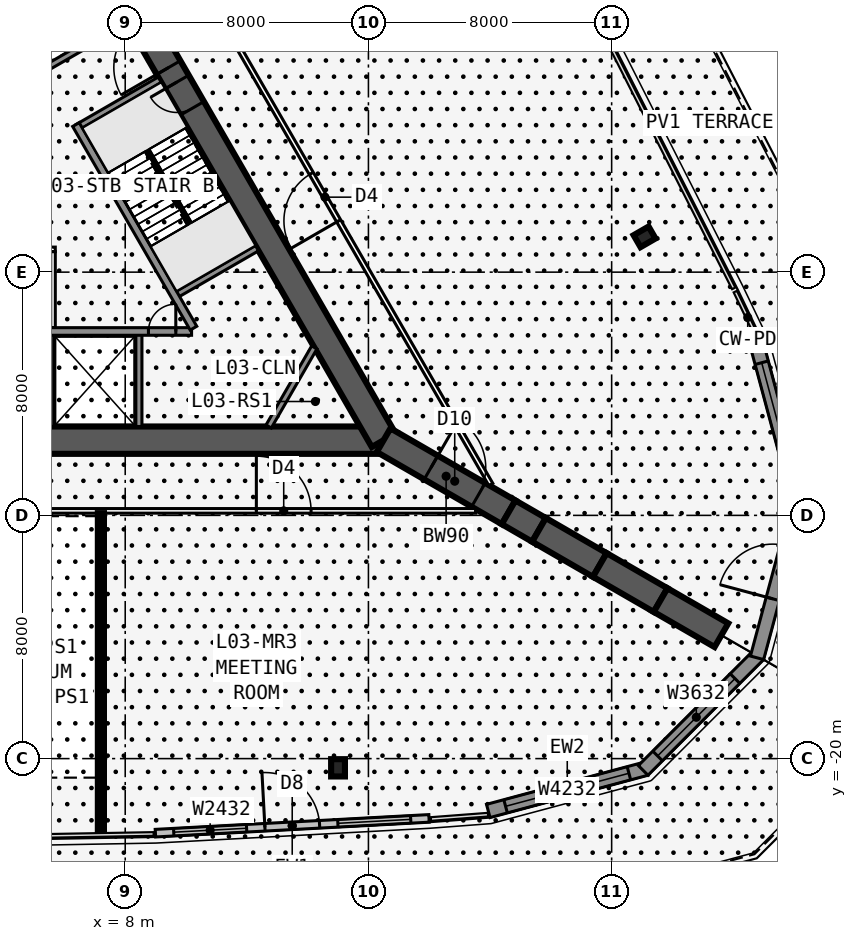
"""IFC4 building model, lengths in metres.
Left out: names, types, materials, properties, quantities, classifications, styles, units other than length and angle.
Written with IfcOpenShell. Run it as: python <this file> out.ifc"""

import sys

from ifc_helpers import new_model, si_unit, direction, frame, frame_2d, origin, origin_2d, place, context, subcontext, project, spatial, rectangle, i_section, extrude, element, fill, save


model = new_model("IFC4")
c1 = context("Model", 3, precision=1e-05, world=origin(), true_north=direction((0.0, 1.0)))
c2 = subcontext(c1, "Body", "Model", "MODEL_VIEW")
j1 = project(units=[si_unit("LENGTHUNIT", "METRE"), si_unit("PLANEANGLEUNIT", "RADIAN")], contexts=[c1])
p1 = place(None, origin())
s1 = spatial("IfcSite", under=j1, at=p1, CompositionType="ELEMENT")
p2 = place(p1, origin())
s2 = spatial("IfcBuilding", under=s1, at=p2, CompositionType="ELEMENT")
p3 = place(p2, frame((0.0, 0.0, 17.5)))
s3 = spatial("IfcBuildingStorey", under=s2, at=p3, CompositionType="ELEMENT", Elevation=17.5)
p4 = place(p3, frame((-16.5, -9.526, 0.0), z_axis=(0.0, 0.0, 1.0), x_axis=(1.0, 0.0, 0.0)))
e1 = element("IfcWall", 1, at=p4, inside=s3, PredefinedType="SHEAR", context=c2, shape_type="SweptSolid", body=[
    extrude(rectangle(XDim=33.0, YDim=0.9, at=frame_2d((16.5, 0.0))), origin(), (0.0, 0.0, 1.0), 5.0),
])
p5 = place(p4, frame((14.05, 0.0, 0.0)))
e2 = element("IfcOpeningElement", 2, at=p5, cuts=e1, PredefinedType="OPENING", context=c2, shape_type="SweptSolid", body=[
    extrude(rectangle(XDim=1.8, YDim=2.13, at=frame_2d((0.9, 1.065))), frame((0.0, 0.46, 0.0), z_axis=(0.0, -1.0, 0.0), x_axis=(1.0, 0.0, 0.0)), (0.0, 0.0, 1.0), 0.92),
])
p6 = place(p3, frame((-0.55, -5.951, 0.0), z_axis=(0.0, 0.0, 1.0), x_axis=(1.0, 0.0, 0.0)))
e3 = element("IfcWall", 3, at=p6, inside=s3, PredefinedType="SOLIDWALL", context=c2, shape_type="SweptSolid", body=[
    extrude(rectangle(XDim=10.733, YDim=0.25, at=frame_2d((5.366, 0.0))), origin(), (0.0, 0.0, 1.0), 4.75),
])
p7 = place(p6, frame((9.314, 0.0, 0.0)))
e4 = element("IfcOpeningElement", 4, at=p7, cuts=e3, PredefinedType="OPENING", context=c2, shape_type="SweptSolid", body=[
    extrude(rectangle(XDim=0.9, YDim=2.13, at=frame_2d((0.45, 1.065))), frame((0.0, 0.135, 0.0), z_axis=(0.0, -1.0, 0.0), x_axis=(1.0, 0.0, 0.0)), (0.0, 0.0, 1.0), 0.27),
])
p8 = place(p6, frame((1.05, 0.0, 0.0)))
e5 = element("IfcOpeningElement", 5, at=p8, cuts=e3, PredefinedType="OPENING", context=c2, shape_type="SweptSolid", body=[
    extrude(rectangle(XDim=1.1, YDim=2.13, at=frame_2d((0.55, 1.065))), frame((0.0, 0.135, 0.0), z_axis=(0.0, -1.0, 0.0), x_axis=(1.0, 0.0, 0.0)), (0.0, 0.0, 1.0), 0.27),
])
p9 = place(p6, frame((4.05, 0.0, 0.0)))
e6 = element("IfcOpeningElement", 6, at=p9, cuts=e3, PredefinedType="OPENING", context=c2, shape_type="SweptSolid", body=[
    extrude(rectangle(XDim=1.1, YDim=2.13, at=frame_2d((0.55, 1.065))), frame((0.0, 0.135, 0.0), z_axis=(0.0, -1.0, 0.0), x_axis=(1.0, 0.0, 0.0)), (0.0, 0.0, 1.0), 0.27),
])
for number, where, z_axis, x_axis in (
    (7, (5.55, -5.951, 0.0), (0.0, 0.0, 1.0), (0.0, -1.0, 0.0)),
    (8, (8.45, -5.951, 0.0), (0.0, 0.0, 1.0), (0.0, -1.0, 0.0)),
):
    element("IfcWall", number, at=place(p3, frame(where, z_axis=z_axis, x_axis=x_axis)), inside=s3, PredefinedType="SOLIDWALL", context=c2, shape_type="SweptSolid", body=[
        extrude(rectangle(XDim=3.125, YDim=0.2, at=frame_2d((1.562, 0.0))), origin(), (0.0, 0.0, 1.0), 4.75),
    ])
p10 = place(p3, frame((16.5, -9.526, 0.0), z_axis=(0.0, 0.0, 1.0), x_axis=(-0.499999749417, 0.866025548458, 0.0)))
e9 = element("IfcWall", 9, at=p10, inside=s3, PredefinedType="SHEAR", context=c2, shape_type="SweptSolid", body=[
    extrude(rectangle(XDim=33.0, YDim=0.9, at=frame_2d((16.5, 0.0))), origin(), (0.0, 0.0, 1.0), 5.0),
])
p11 = place(p10, frame((14.15, 0.0, 0.0)))
e10 = element("IfcOpeningElement", 10, at=p11, cuts=e9, PredefinedType="OPENING", context=c2, shape_type="SweptSolid", body=[
    extrude(rectangle(XDim=1.8, YDim=2.13, at=frame_2d((0.9, 1.065))), frame((0.0, 0.46, 0.0), z_axis=(0.0, -1.0, 0.0), x_axis=(1.0, 0.0, 0.0)), (0.0, 0.0, 1.0), 0.92),
])
p12 = place(p10, frame((12.6, 0.0, 0.0)))
e11 = element("IfcOpeningElement", 11, at=p12, cuts=e9, PredefinedType="OPENING", context=c2, shape_type="SweptSolid", body=[
    extrude(rectangle(XDim=1.0, YDim=2.13, at=frame_2d((0.5, 1.065))), frame((0.0, 0.46, 0.0), z_axis=(0.0, -1.0, 0.0), x_axis=(1.0, 0.0, 0.0)), (0.0, 0.0, 1.0), 0.92),
])
p13 = place(p3, frame((10.245, -5.843, 0.0), z_axis=(0.0, 0.0, 1.0), x_axis=(-0.499993009313, 0.866029439822, 0.0)))
e12 = element("IfcWall", 12, at=p13, inside=s3, PredefinedType="SOLIDWALL", context=c2, shape_type="SweptSolid", body=[
    extrude(rectangle(XDim=7.733, YDim=0.25, at=frame_2d((3.866, 0.0))), origin(), (0.0, 0.0, 1.0), 4.75),
])
for number, where, z_axis, x_axis in (
    (13, (9.629, -4.775, 0.0), (0.0, 0.0, 1.0), (0.866, 0.5, 0.0)),
    (14, (6.429, 0.767, 0.0), (0.0, 0.0, 1.0), (0.866, 0.5, 0.0)),
    (15, (5.329, 2.673, 0.0), (0.0, 0.0, 1.0), (0.866, 0.5, 0.0)),
):
    element("IfcWall", number, at=place(p3, frame(where, z_axis=z_axis, x_axis=x_axis)), inside=s3, PredefinedType="SOLIDWALL", context=c2, shape_type="SweptSolid", body=[
        extrude(rectangle(XDim=3.125, YDim=0.2, at=frame_2d((1.562, 0.0))), origin(), (0.0, 0.0, 1.0), 4.75),
    ])
p14 = place(p3, frame((16.5, -9.526, 0.0), z_axis=(0.0, 0.0, 1.0), x_axis=(0.866031398331, -0.499989616998, 0.0)))
e16 = element("IfcWall", 16, at=p14, inside=s3, PredefinedType="SHEAR", context=c2, shape_type="SweptSolid", body=[
    extrude(rectangle(XDim=4.746, YDim=0.9, at=frame_2d((2.373, 0.0))), origin(), (0.0, 0.0, 1.0), 5.0),
])
p15 = place(p14, frame((1.8, 0.0, 0.0)))
e17 = element("IfcOpeningElement", 17, at=p15, cuts=e16, PredefinedType="OPENING", context=c2, shape_type="SweptSolid", body=[
    extrude(rectangle(XDim=1.8, YDim=2.13, at=frame_2d((0.9, 1.065))), frame((0.0, 0.46, 0.0), z_axis=(0.0, -1.0, 0.0), x_axis=(1.0, 0.0, 0.0)), (0.0, 0.0, 1.0), 0.92),
])
p16 = place(p3, frame((20.61, -11.899, 0.0), z_axis=(0.0, 0.0, 1.0), x_axis=(0.866009537788, -0.500027479704, 0.0)))
e18 = element("IfcWall", 18, at=p16, inside=s3, PredefinedType="SHEAR", context=c2, shape_type="SweptSolid", body=[
    extrude(rectangle(XDim=1.155, YDim=0.9, at=frame_2d((0.577, 0.0))), origin(), (0.0, 0.0, 1.0), 5.0),
])
for number, where, z_axis, x_axis in (
    (19, (21.61, -12.477, 0.0), (0.0, 0.0, 1.0), (0.866, -0.5, 0.0)),
    (20, (23.61, -13.631, 0.0), (0.0, 0.0, 1.0), (0.866, -0.5, 0.0)),
    (21, (25.61, -14.786, 0.0), (0.0, 0.0, 1.0), (0.866, -0.5, 0.0)),
):
    element("IfcWall", number, at=place(p3, frame(where, z_axis=z_axis, x_axis=x_axis)), inside=s3, PredefinedType="SHEAR", context=c2, shape_type="SweptSolid", body=[
        extrude(rectangle(XDim=2.309, YDim=0.9, at=frame_2d((1.155, 0.0))), origin(), (0.0, 0.0, 1.0), 5.0),
    ])
for number, where, z_axis, x_axis in (
    (22, (15.0, -20.303, 0.0), (0.0, 0.0, 1.0), (1.0, 0.0, 0.0)),
    (23, (25.083, -2.839, 0.0), (0.0, 0.0, 1.0), (-0.5, 0.866, 0.0)),
):
    element("IfcColumn", number, at=place(p3, frame(where, z_axis=z_axis, x_axis=x_axis)), inside=s3, PredefinedType="COLUMN", context=c2, shape_type="SweptSolid", body=[
        extrude(i_section(OverallWidth=0.455, OverallDepth=0.569, WebThickness=0.078, FlangeThickness=0.125, at=origin_2d()), origin(), (0.0, 0.0, 1.0), 5.0),
    ])
p17 = place(p3, frame((8.993, -22.452, 0.0), z_axis=(0.0, 0.0, 1.0), x_axis=(0.998546137511, 0.053903722158, 0.0)))
e24 = element("IfcWall", 24, at=p17, inside=s3, PredefinedType="STANDARD", context=c2, shape_type="SweptSolid", body=[
    extrude(rectangle(XDim=9.013, YDim=0.25, at=frame_2d((4.507, 0.0))), origin(), (0.0, 0.0, 1.0), 4.75),
])
p18 = place(p17, frame((3.607, 0.0, 0.0)))
e25 = element("IfcOpeningElement", 25, at=p18, cuts=e24, PredefinedType="OPENING", context=c2, shape_type="SweptSolid", body=[
    extrude(rectangle(XDim=1.8, YDim=2.4, at=frame_2d((0.9, 1.2))), frame((0.0, 0.135, 0.0), z_axis=(0.0, -1.0, 0.0), x_axis=(1.0, 0.0, 0.0)), (0.0, 0.0, 1.0), 0.27),
])
p19 = place(p17, frame((0.603, 0.0, 0.6)))
e26 = element("IfcOpeningElement", 26, at=p19, cuts=e24, PredefinedType="OPENING", context=c2, shape_type="SweptSolid", body=[
    extrude(rectangle(XDim=2.4, YDim=3.2, at=frame_2d((1.2, 1.6))), frame((0.0, 0.135, 0.0), z_axis=(0.0, -1.0, 0.0), x_axis=(1.0, 0.0, 0.0)), (0.0, 0.0, 1.0), 0.27),
])
p20 = place(p17, frame((6.01, 0.0, 0.6)))
e27 = element("IfcOpeningElement", 27, at=p20, cuts=e24, PredefinedType="OPENING", context=c2, shape_type="SweptSolid", body=[
    extrude(rectangle(XDim=2.4, YDim=3.2, at=frame_2d((1.2, 1.6))), frame((0.0, 0.135, 0.0), z_axis=(0.0, -1.0, 0.0), x_axis=(1.0, 0.0, 0.0)), (0.0, 0.0, 1.0), 0.27),
])
p21 = place(p3, frame((19.942, -21.722, 0.0), z_axis=(0.0, 0.0, 1.0), x_axis=(0.965923133363, 0.258829095032, 0.0)))
e28 = element("IfcWall", 28, at=p21, inside=s3, PredefinedType="SOLIDWALL", context=c2, shape_type="SweptSolid", body=[
    extrude(rectangle(XDim=5.379, YDim=0.45, at=frame_2d((2.69, 0.0))), origin(), (0.0, 0.0, 1.0), 4.75),
])
p22 = place(p21, frame((0.59, 0.0, 0.6)))
e29 = element("IfcOpeningElement", 29, at=p22, cuts=e28, PredefinedType="OPENING", context=c2, shape_type="SweptSolid", body=[
    extrude(rectangle(XDim=4.2, YDim=3.2, at=frame_2d((2.1, 1.6))), frame((0.0, 0.235, 0.0), z_axis=(0.0, -1.0, 0.0), x_axis=(1.0, 0.0, 0.0)), (0.0, 0.0, 1.0), 0.47),
])
p23 = place(p3, frame((25.037, -20.388, 0.0), z_axis=(0.0, 0.0, 1.0), x_axis=(0.707084088779, 0.707129472866, 0.0)))
e30 = element("IfcWall", 30, at=p23, inside=s3, PredefinedType="SOLIDWALL", context=c2, shape_type="SweptSolid", body=[
    extrude(rectangle(XDim=5.379, YDim=0.45, at=frame_2d((2.69, 0.0))), origin(), (0.0, 0.0, 1.0), 4.75),
])
p24 = place(p23, frame((0.671, 0.0, 0.6)))
e31 = element("IfcOpeningElement", 31, at=p24, cuts=e30, PredefinedType="OPENING", context=c2, shape_type="SweptSolid", body=[
    extrude(rectangle(XDim=3.6, YDim=3.2, at=frame_2d((1.8, 1.6))), frame((0.0, 0.235, 0.0), z_axis=(0.0, -1.0, 0.0), x_axis=(1.0, 0.0, 0.0)), (0.0, 0.0, 1.0), 0.47),
])
p25 = place(p3, frame((28.783, -16.685, 0.0), z_axis=(0.0, 0.0, 1.0), x_axis=(0.258817748921, 0.965926173599, 0.0)))
e32 = element("IfcWall", 32, at=p25, inside=s3, PredefinedType="SOLIDWALL", context=c2, shape_type="SweptSolid", body=[
    extrude(rectangle(XDim=5.38, YDim=0.45, at=frame_2d((2.69, 0.0))), origin(), (0.0, 0.0, 1.0), 4.75),
])
p26 = place(p25, frame((2.008, 0.0, 0.0)))
e33 = element("IfcOpeningElement", 33, at=p26, cuts=e32, PredefinedType="OPENING", context=c2, shape_type="SweptSolid", body=[
    extrude(rectangle(XDim=1.8, YDim=2.4, at=frame_2d((0.9, 1.2))), frame((0.0, 0.235, 0.0), z_axis=(0.0, -1.0, 0.0), x_axis=(1.0, 0.0, 0.0)), (0.0, 0.0, 1.0), 0.47),
])
p27 = place(p3, frame((30.175, -11.605, 0.0), z_axis=(0.0, 0.0, 1.0), x_axis=(-0.258829095032, 0.965923133363, 0.0)))
e34 = element("IfcWall", 34, at=p27, inside=s3, PredefinedType="SOLIDWALL", context=c2, shape_type="SweptSolid", body=[
    extrude(rectangle(XDim=5.379, YDim=0.45, at=frame_2d((2.69, 0.0))), origin(), (0.0, 0.0, 1.0), 4.75),
])
p28 = place(p27, frame((0.59, 0.0, 0.6)))
e35 = element("IfcOpeningElement", 35, at=p28, cuts=e34, PredefinedType="OPENING", context=c2, shape_type="SweptSolid", body=[
    extrude(rectangle(XDim=4.2, YDim=3.2, at=frame_2d((2.1, 1.6))), frame((0.0, 0.235, 0.0), z_axis=(0.0, -1.0, 0.0), x_axis=(1.0, 0.0, 0.0)), (0.0, 0.0, 1.0), 0.47),
])
p29 = place(p3, frame((-19.527, -11.851, 0.0), z_axis=(0.0, 0.0, 1.0), x_axis=(1.0, 0.0, 0.0)))
e36 = element("IfcWall", 36, at=p29, inside=s3, PredefinedType="PARTITIONING", context=c2, shape_type="SweptSolid", body=[
    extrude(rectangle(XDim=39.054, YDim=0.15, at=frame_2d((19.527, 0.0))), origin(), (0.0, 0.0, 1.0), 4.75),
])
p30 = place(p29, frame((6.013, 0.0, 0.0)))
e37 = element("IfcOpeningElement", 37, at=p30, cuts=e36, PredefinedType="OPENING", context=c2, shape_type="SweptSolid", body=[
    extrude(rectangle(XDim=1.8, YDim=2.13, at=frame_2d((0.9, 1.065))), frame((0.0, 0.085, 0.0), z_axis=(0.0, -1.0, 0.0), x_axis=(1.0, 0.0, 0.0)), (0.0, 0.0, 1.0), 0.17),
])
p31 = place(p29, frame((16.627, 0.0, 0.0)))
e38 = element("IfcOpeningElement", 38, at=p31, cuts=e36, PredefinedType="OPENING", context=c2, shape_type="SweptSolid", body=[
    extrude(rectangle(XDim=1.8, YDim=2.13, at=frame_2d((0.9, 1.065))), frame((0.0, 0.085, 0.0), z_axis=(0.0, -1.0, 0.0), x_axis=(1.0, 0.0, 0.0)), (0.0, 0.0, 1.0), 0.17),
])
p32 = place(p29, frame((23.227, 0.0, 0.0)))
e39 = element("IfcOpeningElement", 39, at=p32, cuts=e36, PredefinedType="OPENING", context=c2, shape_type="SweptSolid", body=[
    extrude(rectangle(XDim=1.8, YDim=2.13, at=frame_2d((0.9, 1.065))), frame((0.0, 0.085, 0.0), z_axis=(0.0, -1.0, 0.0), x_axis=(1.0, 0.0, 0.0)), (0.0, 0.0, 1.0), 0.17),
])
p33 = place(p29, frame((31.841, 0.0, 0.0)))
e40 = element("IfcOpeningElement", 40, at=p33, cuts=e36, PredefinedType="OPENING", context=c2, shape_type="SweptSolid", body=[
    extrude(rectangle(XDim=1.8, YDim=2.13, at=frame_2d((0.9, 1.065))), frame((0.0, 0.085, 0.0), z_axis=(0.0, -1.0, 0.0), x_axis=(1.0, 0.0, 0.0)), (0.0, 0.0, 1.0), 0.17),
])
p34 = place(p3, frame((7.2, -11.926, 0.0), z_axis=(0.0, 0.0, 1.0), x_axis=(0.0, -1.0, 0.0)))
e41 = element("IfcWall", 41, at=p34, inside=s3, PredefinedType="SHEAR", context=c2, shape_type="SweptSolid", body=[
    extrude(rectangle(XDim=10.502, YDim=0.2, at=frame_2d((5.251, 0.0))), origin(), (0.0, 0.0, 1.0), 5.0),
])
p35 = place(p3, frame((20.027, -10.985, 0.0), z_axis=(0.0, 0.0, 1.0), x_axis=(-0.500001677587, 0.866024435227, 0.0)))
e42 = element("IfcWall", 42, at=p35, inside=s3, PredefinedType="PARTITIONING", context=c2, shape_type="SweptSolid", body=[
    extrude(rectangle(XDim=39.054, YDim=0.15, at=frame_2d((19.527, 0.0))), origin(), (0.0, 0.0, 1.0), 4.75),
])
p36 = place(p35, frame((10.013, 0.0, 0.0)))
e43 = element("IfcOpeningElement", 43, at=p36, cuts=e42, PredefinedType="OPENING", context=c2, shape_type="SweptSolid", body=[
    extrude(rectangle(XDim=1.8, YDim=2.13, at=frame_2d((0.9, 1.065))), frame((0.0, 0.085, 0.0), z_axis=(0.0, -1.0, 0.0), x_axis=(1.0, 0.0, 0.0)), (0.0, 0.0, 1.0), 0.17),
])
p37 = place(p35, frame((23.227, 0.0, 0.0)))
e44 = element("IfcOpeningElement", 44, at=p37, cuts=e42, PredefinedType="OPENING", context=c2, shape_type="SweptSolid", body=[
    extrude(rectangle(XDim=1.8, YDim=2.13, at=frame_2d((0.9, 1.065))), frame((0.0, 0.085, 0.0), z_axis=(0.0, -1.0, 0.0), x_axis=(1.0, 0.0, 0.0)), (0.0, 0.0, 1.0), 0.17),
])
p38 = place(p35, frame((27.627, 0.0, 0.0)))
e45 = element("IfcOpeningElement", 45, at=p38, cuts=e42, PredefinedType="OPENING", context=c2, shape_type="SweptSolid", body=[
    extrude(rectangle(XDim=1.0, YDim=2.13, at=frame_2d((0.5, 1.065))), frame((0.0, 0.085, 0.0), z_axis=(0.0, -1.0, 0.0), x_axis=(1.0, 0.0, 0.0)), (0.0, 0.0, 1.0), 0.17),
])
p39 = place(p35, frame((30.527, 0.0, 0.0)))
e46 = element("IfcOpeningElement", 46, at=p39, cuts=e42, PredefinedType="OPENING", context=c2, shape_type="SweptSolid", body=[
    extrude(rectangle(XDim=1.0, YDim=2.13, at=frame_2d((0.5, 1.065))), frame((0.0, 0.085, 0.0), z_axis=(0.0, -1.0, 0.0), x_axis=(1.0, 0.0, 0.0)), (0.0, 0.0, 1.0), 0.17),
])
p40 = place(p35, frame((33.277, 0.0, 0.0)))
e47 = element("IfcOpeningElement", 47, at=p40, cuts=e42, PredefinedType="OPENING", context=c2, shape_type="SweptSolid", body=[
    extrude(rectangle(XDim=1.0, YDim=2.13, at=frame_2d((0.5, 1.065))), frame((0.0, 0.085, 0.0), z_axis=(0.0, -1.0, 0.0), x_axis=(1.0, 0.0, 0.0)), (0.0, 0.0, 1.0), 0.17),
])
p41 = place(p35, frame((36.39, 0.0, 0.0)))
e48 = element("IfcOpeningElement", 48, at=p41, cuts=e42, PredefinedType="OPENING", context=c2, shape_type="SweptSolid", body=[
    extrude(rectangle(XDim=1.0, YDim=2.13, at=frame_2d((0.5, 1.065))), frame((0.0, 0.085, 0.0), z_axis=(0.0, -1.0, 0.0), x_axis=(1.0, 0.0, 0.0)), (0.0, 0.0, 1.0), 0.17),
])
p42 = place(p3, frame((-2.65, -3.251, 0.0), z_axis=(0.0, 0.0, 1.0), x_axis=(1.0, 0.0, 0.0)))
e49 = element("IfcWall", 49, at=p42, inside=s3, PredefinedType="PARTITIONING", context=c2, shape_type="SweptSolid", body=[
    extrude(rectangle(XDim=8.35, YDim=0.15, at=frame_2d((4.175, 0.0))), origin(), (0.0, 0.0, 1.0), 4.75),
])
p43 = place(p3, frame((5.625, -5.826, 0.0), z_axis=(0.0, 0.0, 1.0), x_axis=(0.0, 1.0, 0.0)))
e50 = element("IfcWall", 50, at=p43, inside=s3, PredefinedType="PARTITIONING", context=c2, shape_type="SweptSolid", body=[
    extrude(rectangle(XDim=2.5, YDim=0.15, at=frame_2d((1.25, 0.0))), origin(), (0.0, 0.0, 1.0), 4.75),
])
p44 = place(p3, frame((14.219, -6.476, 0.0), z_axis=(0.0, 0.0, 1.0), x_axis=(-0.499952404951, -0.866052881055, 0.0)))
e51 = element("IfcWall", 51, at=p44, inside=s3, PredefinedType="SOLIDWALL", context=c2, shape_type="SweptSolid", body=[
    extrude(rectangle(XDim=3.002, YDim=0.2, at=frame_2d((1.501, 0.0))), origin(), (0.0, 0.0, 1.0), 4.75),
])
p45 = place(p3, frame((10.135, -2.401, 0.0), z_axis=(0.0, 0.0, 1.0), x_axis=(-0.499992232847, 0.866029888106, 0.0)))
e52 = element("IfcWall", 52, at=p45, inside=s3, PredefinedType="SOLIDWALL", context=c2, shape_type="SweptSolid", body=[
    extrude(rectangle(XDim=2.794, YDim=0.1, at=frame_2d((1.397, 0.0))), origin(), (0.0, 0.0, 1.0), 5.0),
])
p46 = place(p18, origin())
e53 = element("IfcDoor", 53, at=p46, inside=s3, OperationType="DOUBLE_DOOR_SINGLE_SWING", PredefinedType="DOOR", context=c2, shape_type="SweptSolid", body=[
    extrude(rectangle(XDim=1.8, YDim=2.4, at=frame_2d((0.9, 1.2))), frame((0.0, 0.025, 0.0), z_axis=(0.0, -1.0, 0.0), x_axis=(1.0, 0.0, 0.0)), (0.0, 0.0, 1.0), 0.05),
])
fill(e25, e53)
p47 = place(p19, origin())
e54 = element("IfcWindow", 54, at=p47, inside=s3, PartitioningType="SINGLE_PANEL", PredefinedType="WINDOW", context=c2, shape_type="SweptSolid", body=[
    extrude(rectangle(XDim=2.4, YDim=3.2, at=frame_2d((1.2, 1.6))), frame((0.0, 0.03, 0.0), z_axis=(0.0, -1.0, 0.0), x_axis=(1.0, 0.0, 0.0)), (0.0, 0.0, 1.0), 0.06),
])
fill(e26, e54)
p48 = place(p20, origin())
e55 = element("IfcWindow", 55, at=p48, inside=s3, PartitioningType="SINGLE_PANEL", PredefinedType="WINDOW", context=c2, shape_type="SweptSolid", body=[
    extrude(rectangle(XDim=2.4, YDim=3.2, at=frame_2d((1.2, 1.6))), frame((0.0, 0.03, 0.0), z_axis=(0.0, -1.0, 0.0), x_axis=(1.0, 0.0, 0.0)), (0.0, 0.0, 1.0), 0.06),
])
fill(e27, e55)
p49 = place(p22, origin())
e56 = element("IfcWindow", 56, at=p49, inside=s3, PartitioningType="SINGLE_PANEL", PredefinedType="WINDOW", context=c2, shape_type="SweptSolid", body=[
    extrude(rectangle(XDim=4.2, YDim=3.2, at=frame_2d((2.1, 1.6))), frame((0.0, 0.03, 0.0), z_axis=(0.0, -1.0, 0.0), x_axis=(1.0, 0.0, 0.0)), (0.0, 0.0, 1.0), 0.06),
])
fill(e29, e56)
p50 = place(p24, origin())
e57 = element("IfcWindow", 57, at=p50, inside=s3, PartitioningType="SINGLE_PANEL", PredefinedType="WINDOW", context=c2, shape_type="SweptSolid", body=[
    extrude(rectangle(XDim=3.6, YDim=3.2, at=frame_2d((1.8, 1.6))), frame((0.0, 0.03, 0.0), z_axis=(0.0, -1.0, 0.0), x_axis=(1.0, 0.0, 0.0)), (0.0, 0.0, 1.0), 0.06),
])
fill(e31, e57)
p51 = place(p26, origin())
e58 = element("IfcDoor", 58, at=p51, inside=s3, OperationType="DOUBLE_DOOR_SINGLE_SWING", PredefinedType="DOOR", context=c2, shape_type="SweptSolid", body=[
    extrude(rectangle(XDim=1.8, YDim=2.4, at=frame_2d((0.9, 1.2))), frame((0.0, 0.025, 0.0), z_axis=(0.0, -1.0, 0.0), x_axis=(1.0, 0.0, 0.0)), (0.0, 0.0, 1.0), 0.05),
])
fill(e33, e58)
p52 = place(p28, origin())
e59 = element("IfcWindow", 59, at=p52, inside=s3, PartitioningType="SINGLE_PANEL", PredefinedType="WINDOW", context=c2, shape_type="SweptSolid", body=[
    extrude(rectangle(XDim=4.2, YDim=3.2, at=frame_2d((2.1, 1.6))), frame((0.0, 0.03, 0.0), z_axis=(0.0, -1.0, 0.0), x_axis=(1.0, 0.0, 0.0)), (0.0, 0.0, 1.0), 0.06),
])
fill(e35, e59)
p53 = place(p33, origin())
e60 = element("IfcDoor", 60, at=p53, inside=s3, OperationType="DOUBLE_DOOR_SINGLE_SWING", PredefinedType="DOOR", context=c2, shape_type="SweptSolid", body=[
    extrude(rectangle(XDim=1.8, YDim=2.13, at=frame_2d((0.9, 1.065))), frame((0.0, 0.025, 0.0), z_axis=(0.0, -1.0, 0.0), x_axis=(1.0, 0.0, 0.0)), (0.0, 0.0, 1.0), 0.05),
])
fill(e40, e60)
p54 = place(p36, origin())
e61 = element("IfcDoor", 61, at=p54, inside=s3, OperationType="DOUBLE_DOOR_SINGLE_SWING", PredefinedType="DOOR", context=c2, shape_type="SweptSolid", body=[
    extrude(rectangle(XDim=1.8, YDim=2.13, at=frame_2d((0.9, 1.065))), frame((0.0, 0.025, 0.0), z_axis=(0.0, -1.0, 0.0), x_axis=(1.0, 0.0, 0.0)), (0.0, 0.0, 1.0), 0.05),
])
fill(e43, e61)
p55 = place(p11, origin())
e62 = element("IfcDoor", 62, at=p55, inside=s3, OperationType="DOUBLE_DOOR_SINGLE_SWING", PredefinedType="DOOR", context=c2, shape_type="SweptSolid", body=[
    extrude(rectangle(XDim=1.8, YDim=2.13, at=frame_2d((0.9, 1.065))), frame((0.0, 0.025, 0.0), z_axis=(0.0, -1.0, 0.0), x_axis=(1.0, 0.0, 0.0)), (0.0, 0.0, 1.0), 0.05),
])
fill(e10, e62)
p56 = place(p12, origin())
e63 = element("IfcDoor", 63, at=p56, inside=s3, OperationType="SINGLE_SWING_RIGHT", PredefinedType="DOOR", context=c2, shape_type="SweptSolid", body=[
    extrude(rectangle(XDim=1.0, YDim=2.13, at=frame_2d((0.5, 1.065))), frame((0.0, 0.025, 0.0), z_axis=(0.0, -1.0, 0.0), x_axis=(1.0, 0.0, 0.0)), (0.0, 0.0, 1.0), 0.05),
])
fill(e11, e63)
p57 = place(p15, origin())
e64 = element("IfcDoor", 64, at=p57, inside=s3, OperationType="DOUBLE_DOOR_DOUBLE_SWING", PredefinedType="DOOR", context=c2, shape_type="SweptSolid", body=[
    extrude(rectangle(XDim=1.8, YDim=2.13, at=frame_2d((0.9, 1.065))), frame((0.0, 0.025, 0.0), z_axis=(0.0, -1.0, 0.0), x_axis=(1.0, 0.0, 0.0)), (0.0, 0.0, 1.0), 0.05),
])
fill(e17, e64)
p58 = place(p7, origin())
e65 = element("IfcDoor", 65, at=p58, inside=s3, OperationType="SINGLE_SWING_RIGHT", PredefinedType="DOOR", context=c2, shape_type="SweptSolid", body=[
    extrude(rectangle(XDim=0.9, YDim=2.13, at=frame_2d((0.45, 1.065))), frame((0.0, 0.025, 0.0), z_axis=(0.0, -1.0, 0.0), x_axis=(1.0, 0.0, 0.0)), (0.0, 0.0, 1.0), 0.05),
])
fill(e4, e65)
save(model, sys.argv[1])
